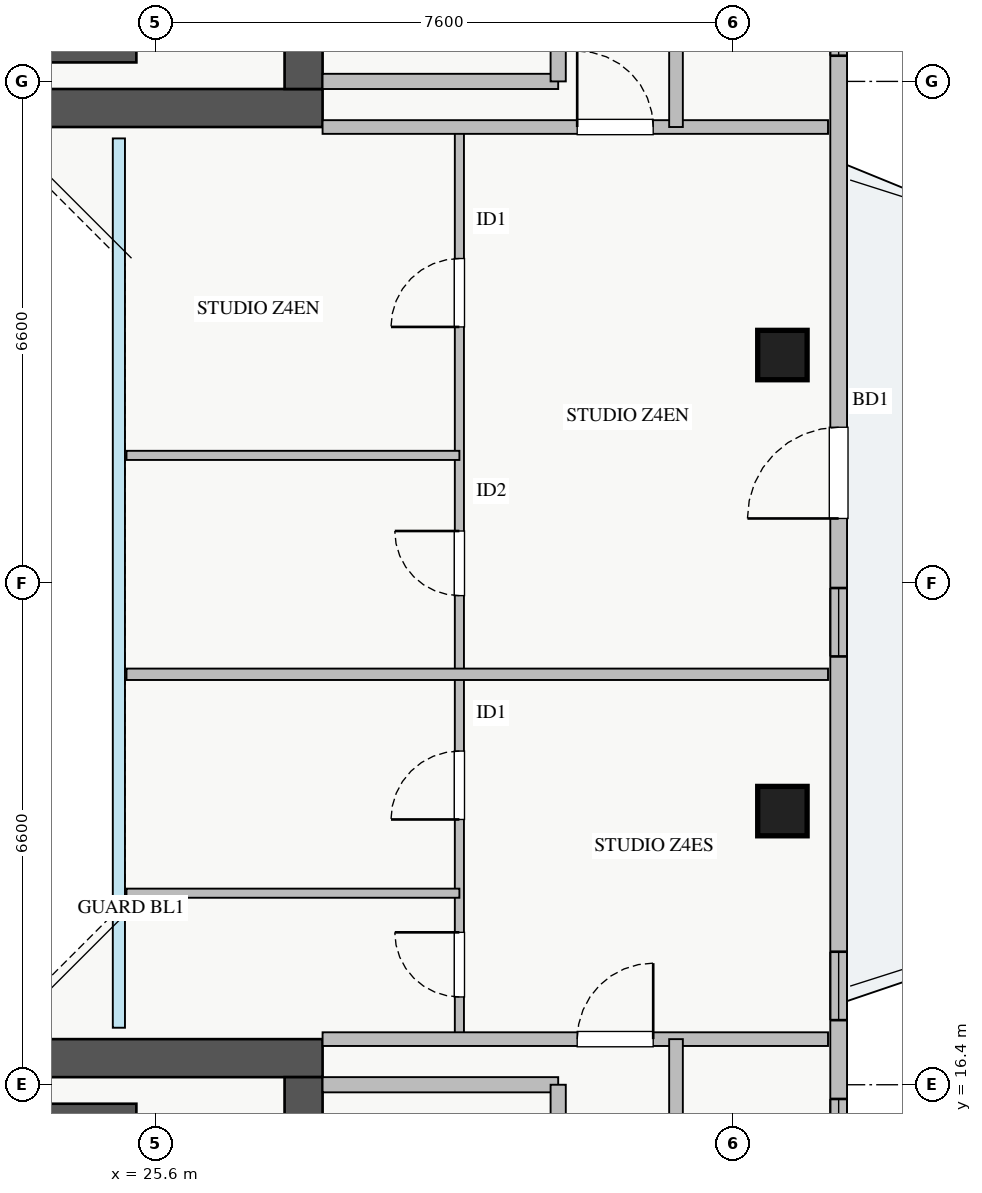
"""IFC4 building model, lengths in metres.
Left out: names, types, materials, properties, quantities, classifications, styles, units other than length and angle.
Written with IfcOpenShell. Run it as: python <this file> out.ifc"""

import sys

from ifc_helpers import new_model, si_unit, direction, frame, frame_2d, origin, origin_2d, place, context, subcontext, project, spatial, rectangle, extrude, source, transform, mapped, element, fill, save


model = new_model("IFC4")
c1 = context("Model", 3, precision=1e-05, world=origin(), true_north=direction((0.0, 1.0)))
c2 = subcontext(c1, "Body", "Model", "MODEL_VIEW")
j1 = project(units=[si_unit("LENGTHUNIT", "METRE"), si_unit("PLANEANGLEUNIT", "RADIAN")], contexts=[c1])
p1 = place(None, origin())
s1 = spatial("IfcSite", under=j1, at=p1, CompositionType="ELEMENT")
p2 = place(p1, origin())
s2 = spatial("IfcBuilding", under=s1, at=p2, CompositionType="ELEMENT")
p3 = place(p2, frame((0.0, 0.0, 247.0)))
s3 = spatial("IfcBuildingStorey", under=s2, at=p3, CompositionType="ELEMENT", Elevation=247.0)
for number, where, z_axis, x_axis in (
    (1, (18.2, 29.95, 0.0), (0.0, 0.0, 1.0), (1.0, 0.0, 0.0)),
    (2, (18.2, 16.05, 0.0), (0.0, 0.0, 1.0), (1.0, 0.0, 0.0)),
):
    element("IfcWall", number, at=place(p3, frame(where, z_axis=z_axis, x_axis=x_axis)), inside=s3, PredefinedType="SHEAR", context=c2, shape_type="SweptSolid", body=[
        extrude(rectangle(XDim=7.15, YDim=0.2, at=frame_2d((3.575, 0.0))), origin(), (0.0, 0.0, 1.0), 3.25),
    ])
p4 = place(p3, frame((10.2, 29.25, 0.0), z_axis=(0.0, 0.0, 1.0), x_axis=(1.0, 0.0, 0.0)))
e3 = element("IfcWall", 3, at=p4, inside=s3, PredefinedType="SHEAR", context=c2, shape_type="SweptSolid", body=[
    extrude(rectangle(XDim=17.6, YDim=0.5, at=frame_2d((8.8, 0.0))), origin(), (0.0, 0.0, 1.0), 3.25),
])
p5 = place(p3, frame((27.55, 29.5, 0.0), z_axis=(0.0, 0.0, 1.0), x_axis=(0.0, 1.0, 0.0)))
e4 = element("IfcWall", 4, at=p5, inside=s3, PredefinedType="SHEAR", context=c2, shape_type="SweptSolid", body=[
    extrude(rectangle(XDim=6.2, YDim=0.5, at=frame_2d((3.1, 0.0))), origin(), (0.0, 0.0, 1.0), 3.25),
])
p6 = place(p5, frame((1.1, 0.0, 0.0)))
e5 = element("IfcOpeningElement", 5, at=p6, cuts=e4, PredefinedType="OPENING", context=c2, shape_type="SweptSolid", body=[
    extrude(rectangle(XDim=1.3, YDim=2.05, at=frame_2d((0.65, 1.025))), frame((0.0, 0.26, 0.0), z_axis=(0.0, -1.0, 0.0), x_axis=(1.0, 0.0, 0.0)), (0.0, 0.0, 1.0), 0.52),
])
p7 = place(p3, frame((10.2, 16.75, 0.0), z_axis=(0.0, 0.0, 1.0), x_axis=(1.0, 0.0, 0.0)))
e6 = element("IfcWall", 6, at=p7, inside=s3, PredefinedType="SHEAR", context=c2, shape_type="SweptSolid", body=[
    extrude(rectangle(XDim=17.6, YDim=0.5, at=frame_2d((8.8, 0.0))), origin(), (0.0, 0.0, 1.0), 3.25),
])
p8 = place(p3, frame((27.55, 10.3, 0.0), z_axis=(0.0, 0.0, 1.0), x_axis=(0.0, 1.0, 0.0)))
e7 = element("IfcWall", 7, at=p8, inside=s3, PredefinedType="SHEAR", context=c2, shape_type="SweptSolid", body=[
    extrude(rectangle(XDim=6.2, YDim=0.5, at=frame_2d((3.1, 0.0))), origin(), (0.0, 0.0, 1.0), 3.25),
])
p9 = place(p8, frame((2.1, 0.0, 0.0)))
e8 = element("IfcOpeningElement", 8, at=p9, cuts=e7, PredefinedType="OPENING", context=c2, shape_type="SweptSolid", body=[
    extrude(rectangle(XDim=1.3, YDim=2.05, at=frame_2d((0.65, 1.025))), frame((0.0, 0.26, 0.0), z_axis=(0.0, -1.0, 0.0), x_axis=(1.0, 0.0, 0.0)), (0.0, 0.0, 1.0), 0.52),
])
m1 = source(origin(), c2, "Body", "SweptSolid", [
    extrude(rectangle(XDim=0.65, YDim=0.65, at=origin_2d()), origin(), (0.0, 0.0, 1.0), 3.25),
])
for number, where, z_axis, x_axis in (
    (9, (33.85, 20.0, 0.0), (0.0, 0.0, 1.0), (1.0, 0.0, 0.0)),
    (10, (33.85, 26.0, 0.0), (0.0, 0.0, 1.0), (1.0, 0.0, 0.0)),
):
    element("IfcColumn", number, at=place(p3, frame(where, z_axis=z_axis, x_axis=x_axis)), inside=s3, PredefinedType="COLUMN", context=c2, shape_type="MappedRepresentation", body=[
        mapped(m1, transform((0.0, 0.0, 0.0), x_axis=(1.0, 0.0, 0.0), y_axis=(0.0, 1.0, 0.0), z_axis=(0.0, 0.0, 1.0), scale=1.0)),
    ])
p10 = place(p3, frame((34.59, 12.35, 0.0), z_axis=(0.0, 0.0, 1.0), x_axis=(0.0, 1.0, 0.0)))
e11 = element("IfcWall", 11, at=p10, inside=s3, PredefinedType="STANDARD", context=c2, shape_type="SweptSolid", body=[
    extrude(rectangle(XDim=21.3, YDim=0.22, at=frame_2d((10.65, 0.0))), origin(), (0.0, 0.0, 1.0), 2.61),
])
p11 = place(p10, frame((11.5, 0.0, 0.0)))
e12 = element("IfcOpeningElement", 12, at=p11, cuts=e11, PredefinedType="OPENING", context=c2, shape_type="SweptSolid", body=[
    extrude(rectangle(XDim=1.2, YDim=2.1, at=frame_2d((0.6, 1.05))), frame((0.0, 0.12, 0.0), z_axis=(0.0, -1.0, 0.0), x_axis=(1.0, 0.0, 0.0)), (0.0, 0.0, 1.0), 0.24),
])
p12 = place(p10, frame((1.463, 0.0, 0.9)))
e13 = element("IfcOpeningElement", 13, at=p12, cuts=e11, PredefinedType="OPENING", context=c2, shape_type="SweptSolid", body=[
    extrude(rectangle(XDim=2.4, YDim=1.48, at=frame_2d((1.2, 0.74))), frame((0.0, 0.12, 0.0), z_axis=(0.0, -1.0, 0.0), x_axis=(1.0, 0.0, 0.0)), (0.0, 0.0, 1.0), 0.24),
])
p13 = place(p10, frame((17.588, 0.0, 0.9)))
e14 = element("IfcOpeningElement", 14, at=p13, cuts=e11, PredefinedType="OPENING", context=c2, shape_type="SweptSolid", body=[
    extrude(rectangle(XDim=2.1, YDim=1.48, at=frame_2d((1.05, 0.74))), frame((0.0, 0.12, 0.0), z_axis=(0.0, -1.0, 0.0), x_axis=(1.0, 0.0, 0.0)), (0.0, 0.0, 1.0), 0.24),
])
p14 = place(p10, frame((4.9, 0.0, 0.9)))
e15 = element("IfcOpeningElement", 15, at=p14, cuts=e11, PredefinedType="OPENING", context=c2, shape_type="SweptSolid", body=[
    extrude(rectangle(XDim=0.9, YDim=1.2, at=frame_2d((0.45, 0.6))), frame((0.0, 0.12, 0.0), z_axis=(0.0, -1.0, 0.0), x_axis=(1.0, 0.0, 0.0)), (0.0, 0.0, 1.0), 0.24),
])
p15 = place(p10, frame((9.685, 0.0, 0.9)))
e16 = element("IfcOpeningElement", 16, at=p15, cuts=e11, PredefinedType="OPENING", context=c2, shape_type="SweptSolid", body=[
    extrude(rectangle(XDim=0.9, YDim=1.2, at=frame_2d((0.45, 0.6))), frame((0.0, 0.12, 0.0), z_axis=(0.0, -1.0, 0.0), x_axis=(1.0, 0.0, 0.0)), (0.0, 0.0, 1.0), 0.24),
])
p16 = place(p3, frame((27.8, 29.6, 0.0), z_axis=(0.0, 0.0, 1.0), x_axis=(1.0, 0.0, 0.0)))
e17 = element("IfcWall", 17, at=p16, inside=s3, PredefinedType="PARTITIONING", context=c2, shape_type="SweptSolid", body=[
    extrude(rectangle(XDim=3.1, YDim=0.2, at=frame_2d((1.55, 0.0))), origin(), (0.0, 0.0, 1.0), 3.07),
])
p17 = place(p3, frame((30.9, 29.6, 0.0), z_axis=(0.0, 0.0, 1.0), x_axis=(0.0, 1.0, 0.0)))
e18 = element("IfcWall", 18, at=p17, inside=s3, PredefinedType="PARTITIONING", context=c2, shape_type="SweptSolid", body=[
    extrude(rectangle(XDim=3.9, YDim=0.2, at=frame_2d((1.95, 0.0))), origin(), (0.0, 0.0, 1.0), 2.715),
])
p18 = place(p17, frame((1.4, 0.0, 0.0)))
e19 = element("IfcOpeningElement", 19, at=p18, cuts=e18, PredefinedType="OPENING", context=c2, shape_type="SweptSolid", body=[
    extrude(rectangle(XDim=1.1, YDim=2.05, at=frame_2d((0.55, 1.025))), frame((0.0, 0.11, 0.0), z_axis=(0.0, -1.0, 0.0), x_axis=(1.0, 0.0, 0.0)), (0.0, 0.0, 1.0), 0.22),
])
p19 = place(p3, frame((27.8, 16.4, 0.0), z_axis=(0.0, 0.0, 1.0), x_axis=(1.0, 0.0, 0.0)))
e20 = element("IfcWall", 20, at=p19, inside=s3, PredefinedType="PARTITIONING", context=c2, shape_type="SweptSolid", body=[
    extrude(rectangle(XDim=3.1, YDim=0.2, at=frame_2d((1.55, 0.0))), origin(), (0.0, 0.0, 1.0), 3.07),
])
p20 = place(p3, frame((30.9, 12.5, 0.0), z_axis=(0.0, 0.0, 1.0), x_axis=(0.0, 1.0, 0.0)))
e21 = element("IfcWall", 21, at=p20, inside=s3, PredefinedType="PARTITIONING", context=c2, shape_type="SweptSolid", body=[
    extrude(rectangle(XDim=3.9, YDim=0.2, at=frame_2d((1.95, 0.0))), origin(), (0.0, 0.0, 1.0), 2.715),
])
p21 = place(p20, frame((1.4, 0.0, 0.0)))
e22 = element("IfcOpeningElement", 22, at=p21, cuts=e21, PredefinedType="OPENING", context=c2, shape_type="SweptSolid", body=[
    extrude(rectangle(XDim=1.1, YDim=2.05, at=frame_2d((0.55, 1.025))), frame((0.0, 0.11, 0.0), z_axis=(0.0, -1.0, 0.0), x_axis=(1.0, 0.0, 0.0)), (0.0, 0.0, 1.0), 0.22),
])
p22 = place(p3, frame((29.6, 17.0, 0.0), z_axis=(0.0, 0.0, 1.0), x_axis=(0.0, 1.0, 0.0)))
e23 = element("IfcWall", 23, at=p22, inside=s3, PredefinedType="PLUMBINGWALL", context=c2, shape_type="SweptSolid", body=[
    extrude(rectangle(XDim=4.8, YDim=0.12, at=frame_2d((2.4, 0.0))), origin(), (0.0, 0.0, 1.0), 3.07),
])
p23 = place(p22, frame((0.555, 0.0, 0.0)))
e24 = element("IfcOpeningElement", 24, at=p23, cuts=e23, PredefinedType="OPENING", context=c2, shape_type="SweptSolid", body=[
    extrude(rectangle(XDim=0.85, YDim=2.05, at=frame_2d((0.425, 1.025))), frame((0.0, 0.07, 0.0), z_axis=(0.0, -1.0, 0.0), x_axis=(1.0, 0.0, 0.0)), (0.0, 0.0, 1.0), 0.14),
])
p24 = place(p22, frame((2.89, 0.0, 0.0)))
e25 = element("IfcOpeningElement", 25, at=p24, cuts=e23, PredefinedType="OPENING", context=c2, shape_type="SweptSolid", body=[
    extrude(rectangle(XDim=0.9, YDim=2.05, at=frame_2d((0.45, 1.025))), frame((0.0, 0.07, 0.0), z_axis=(0.0, -1.0, 0.0), x_axis=(1.0, 0.0, 0.0)), (0.0, 0.0, 1.0), 0.14),
])
p25 = place(p3, frame((25.22, 18.92, 0.0), z_axis=(0.0, 0.0, 1.0), x_axis=(1.0, 0.0, 0.0)))
e26 = element("IfcWall", 26, at=p25, inside=s3, PredefinedType="PLUMBINGWALL", context=c2, shape_type="SweptSolid", body=[
    extrude(rectangle(XDim=4.38, YDim=0.12, at=frame_2d((2.19, 0.0))), origin(), (0.0, 0.0, 1.0), 3.07),
])
p26 = place(p3, frame((29.6, 21.8, 0.0), z_axis=(0.0, 0.0, 1.0), x_axis=(0.0, 1.0, 0.0)))
e27 = element("IfcWall", 27, at=p26, inside=s3, PredefinedType="PLUMBINGWALL", context=c2, shape_type="SweptSolid", body=[
    extrude(rectangle(XDim=7.2, YDim=0.12, at=frame_2d((3.6, 0.0))), origin(), (0.0, 0.0, 1.0), 3.07),
])
p27 = place(p26, frame((1.035, 0.0, 0.0)))
e28 = element("IfcOpeningElement", 28, at=p27, cuts=e27, PredefinedType="OPENING", context=c2, shape_type="SweptSolid", body=[
    extrude(rectangle(XDim=0.85, YDim=2.05, at=frame_2d((0.425, 1.025))), frame((0.0, 0.07, 0.0), z_axis=(0.0, -1.0, 0.0), x_axis=(1.0, 0.0, 0.0)), (0.0, 0.0, 1.0), 0.14),
])
p28 = place(p26, frame((4.57, 0.0, 0.0)))
e29 = element("IfcOpeningElement", 29, at=p28, cuts=e27, PredefinedType="OPENING", context=c2, shape_type="SweptSolid", body=[
    extrude(rectangle(XDim=0.9, YDim=2.05, at=frame_2d((0.45, 1.025))), frame((0.0, 0.07, 0.0), z_axis=(0.0, -1.0, 0.0), x_axis=(1.0, 0.0, 0.0)), (0.0, 0.0, 1.0), 0.14),
])
p29 = place(p3, frame((25.22, 24.68, 0.0), z_axis=(0.0, 0.0, 1.0), x_axis=(1.0, 0.0, 0.0)))
e30 = element("IfcWall", 30, at=p29, inside=s3, PredefinedType="PLUMBINGWALL", context=c2, shape_type="SweptSolid", body=[
    extrude(rectangle(XDim=4.38, YDim=0.12, at=frame_2d((2.19, 0.0))), origin(), (0.0, 0.0, 1.0), 2.815),
])
p30 = place(p3, frame((25.22, 21.8, 0.0), z_axis=(0.0, 0.0, 1.0), x_axis=(1.0, 0.0, 0.0)))
e31 = element("IfcWall", 31, at=p30, inside=s3, PredefinedType="PARTITIONING", context=c2, shape_type="SweptSolid", body=[
    extrude(rectangle(XDim=9.23, YDim=0.15, at=frame_2d((4.615, 0.0))), origin(), (0.0, 0.0, 1.0), 3.07),
])
p31 = place(p3, frame((27.8, 17.0, 0.0), z_axis=(0.0, 0.0, 1.0), x_axis=(1.0, 0.0, 0.0)))
e32 = element("IfcWall", 32, at=p31, inside=s3, PredefinedType="PARTITIONING", context=c2, shape_type="SweptSolid", body=[
    extrude(rectangle(XDim=6.65, YDim=0.18, at=frame_2d((3.325, 0.0))), origin(), (0.0, 0.0, 1.0), 3.07),
])
p32 = place(p31, frame((3.35, 0.0, 0.0)))
e33 = element("IfcOpeningElement", 33, at=p32, cuts=e32, PredefinedType="OPENING", context=c2, shape_type="SweptSolid", body=[
    extrude(rectangle(XDim=1.0, YDim=2.05, at=frame_2d((0.5, 1.025))), frame((0.0, 0.1, 0.0), z_axis=(0.0, -1.0, 0.0), x_axis=(1.0, 0.0, 0.0)), (0.0, 0.0, 1.0), 0.2),
])
p33 = place(p3, frame((27.8, 29.0, 0.0), z_axis=(0.0, 0.0, 1.0), x_axis=(1.0, 0.0, 0.0)))
e34 = element("IfcWall", 34, at=p33, inside=s3, PredefinedType="PARTITIONING", context=c2, shape_type="SweptSolid", body=[
    extrude(rectangle(XDim=6.65, YDim=0.18, at=frame_2d((3.325, 0.0))), origin(), (0.0, 0.0, 1.0), 3.07),
])
p34 = place(p33, frame((3.35, 0.0, 0.0)))
e35 = element("IfcOpeningElement", 35, at=p34, cuts=e34, PredefinedType="OPENING", context=c2, shape_type="SweptSolid", body=[
    extrude(rectangle(XDim=1.0, YDim=2.05, at=frame_2d((0.5, 1.025))), frame((0.0, 0.1, 0.0), z_axis=(0.0, -1.0, 0.0), x_axis=(1.0, 0.0, 0.0)), (0.0, 0.0, 1.0), 0.2),
])
p35 = place(p3, frame((32.45, 29.0, 0.0), z_axis=(0.0, 0.0, 1.0), x_axis=(0.0, 1.0, 0.0)))
e36 = element("IfcWall", 36, at=p35, inside=s3, PredefinedType="PARTITIONING", context=c2, shape_type="SweptSolid", body=[
    extrude(rectangle(XDim=5.18, YDim=0.18, at=frame_2d((2.59, 0.0))), origin(), (0.0, 0.0, 1.0), 3.07),
])
p36 = place(p35, frame((1.25, 0.0, 0.0)))
e37 = element("IfcOpeningElement", 37, at=p36, cuts=e36, PredefinedType="OPENING", context=c2, shape_type="SweptSolid", body=[
    extrude(rectangle(XDim=0.9, YDim=2.05, at=frame_2d((0.45, 1.025))), frame((0.0, 0.1, 0.0), z_axis=(0.0, -1.0, 0.0), x_axis=(1.0, 0.0, 0.0)), (0.0, 0.0, 1.0), 0.2),
])
p37 = place(p3, frame((32.45, 11.82, 0.0), z_axis=(0.0, 0.0, 1.0), x_axis=(0.0, 1.0, 0.0)))
e38 = element("IfcWall", 38, at=p37, inside=s3, PredefinedType="PARTITIONING", context=c2, shape_type="SweptSolid", body=[
    extrude(rectangle(XDim=5.18, YDim=0.18, at=frame_2d((2.59, 0.0))), origin(), (0.0, 0.0, 1.0), 3.07),
])
p38 = place(p37, frame((1.25, 0.0, 0.0)))
e39 = element("IfcOpeningElement", 39, at=p38, cuts=e38, PredefinedType="OPENING", context=c2, shape_type="SweptSolid", body=[
    extrude(rectangle(XDim=0.9, YDim=2.05, at=frame_2d((0.45, 1.025))), frame((0.0, 0.1, 0.0), z_axis=(0.0, -1.0, 0.0), x_axis=(1.0, 0.0, 0.0)), (0.0, 0.0, 1.0), 0.2),
])
m2 = source(origin(), c2, "Body", "SweptSolid", [
    extrude(rectangle(XDim=1.2, YDim=2.1, at=frame_2d((0.6, 1.05))), frame((0.0, 0.025, 0.0), z_axis=(0.0, -1.0, 0.0), x_axis=(1.0, 0.0, 0.0)), (0.0, 0.0, 1.0), 0.05),
])
p39 = place(p11, origin())
e40 = element("IfcDoor", 40, at=p39, inside=s3, OperationType="SINGLE_SWING_LEFT", PredefinedType="DOOR", context=c2, shape_type="MappedRepresentation", body=[
    mapped(m2, transform((0.0, 0.0, 0.0), x_axis=(1.0, 0.0, 0.0), y_axis=(0.0, 1.0, 0.0), z_axis=(0.0, 0.0, 1.0), scale=1.0)),
])
fill(e12, e40)
m3 = source(origin(), c2, "Body", "SweptSolid", [
    extrude(rectangle(XDim=2.4, YDim=1.48, at=frame_2d((1.2, 0.74))), frame((0.0, 0.03, 0.0), z_axis=(0.0, -1.0, 0.0), x_axis=(1.0, 0.0, 0.0)), (0.0, 0.0, 1.0), 0.06),
])
p40 = place(p12, origin())
e41 = element("IfcWindow", 41, at=p40, inside=s3, PartitioningType="TRIPLE_PANEL_VERTICAL", PredefinedType="WINDOW", context=c2, shape_type="MappedRepresentation", body=[
    mapped(m3, transform((0.0, 0.0, 0.0), x_axis=(1.0, 0.0, 0.0), y_axis=(0.0, 1.0, 0.0), z_axis=(0.0, 0.0, 1.0), scale=1.0)),
])
fill(e13, e41)
m4 = source(origin(), c2, "Body", "SweptSolid", [
    extrude(rectangle(XDim=2.1, YDim=1.48, at=frame_2d((1.05, 0.74))), frame((0.0, 0.03, 0.0), z_axis=(0.0, -1.0, 0.0), x_axis=(1.0, 0.0, 0.0)), (0.0, 0.0, 1.0), 0.06),
])
p41 = place(p13, origin())
e42 = element("IfcWindow", 42, at=p41, inside=s3, PartitioningType="TRIPLE_PANEL_VERTICAL", PredefinedType="WINDOW", context=c2, shape_type="MappedRepresentation", body=[
    mapped(m4, transform((0.0, 0.0, 0.0), x_axis=(1.0, 0.0, 0.0), y_axis=(0.0, 1.0, 0.0), z_axis=(0.0, 0.0, 1.0), scale=1.0)),
])
fill(e14, e42)
m5 = source(origin(), c2, "Body", "SweptSolid", [
    extrude(rectangle(XDim=0.85, YDim=2.05, at=frame_2d((0.425, 1.025))), frame((0.0, 0.025, 0.0), z_axis=(0.0, -1.0, 0.0), x_axis=(1.0, 0.0, 0.0)), (0.0, 0.0, 1.0), 0.05),
])
p42 = place(p23, origin())
e43 = element("IfcDoor", 43, at=p42, inside=s3, OperationType="SINGLE_SWING_RIGHT", PredefinedType="DOOR", context=c2, shape_type="MappedRepresentation", body=[
    mapped(m5, transform((0.0, 0.0, 0.0), x_axis=(1.0, 0.0, 0.0), y_axis=(0.0, 1.0, 0.0), z_axis=(0.0, 0.0, 1.0), scale=1.0)),
])
fill(e24, e43)
m6 = source(origin(), c2, "Body", "SweptSolid", [
    extrude(rectangle(XDim=0.9, YDim=2.05, at=frame_2d((0.45, 1.025))), frame((0.0, 0.025, 0.0), z_axis=(0.0, -1.0, 0.0), x_axis=(1.0, 0.0, 0.0)), (0.0, 0.0, 1.0), 0.05),
])
p43 = place(p24, origin())
e44 = element("IfcDoor", 44, at=p43, inside=s3, OperationType="SINGLE_SWING_LEFT", PredefinedType="DOOR", context=c2, shape_type="MappedRepresentation", body=[
    mapped(m6, transform((0.0, 0.0, 0.0), x_axis=(1.0, 0.0, 0.0), y_axis=(0.0, 1.0, 0.0), z_axis=(0.0, 0.0, 1.0), scale=1.0)),
])
fill(e25, e44)
p44 = place(p27, origin())
e45 = element("IfcDoor", 45, at=p44, inside=s3, OperationType="SINGLE_SWING_RIGHT", PredefinedType="DOOR", context=c2, shape_type="MappedRepresentation", body=[
    mapped(m5, transform((0.0, 0.0, 0.0), x_axis=(1.0, 0.0, 0.0), y_axis=(0.0, 1.0, 0.0), z_axis=(0.0, 0.0, 1.0), scale=1.0)),
])
fill(e28, e45)
p45 = place(p28, origin())
e46 = element("IfcDoor", 46, at=p45, inside=s3, OperationType="SINGLE_SWING_LEFT", PredefinedType="DOOR", context=c2, shape_type="MappedRepresentation", body=[
    mapped(m6, transform((0.0, 0.0, 0.0), x_axis=(1.0, 0.0, 0.0), y_axis=(0.0, 1.0, 0.0), z_axis=(0.0, 0.0, 1.0), scale=1.0)),
])
fill(e29, e46)
m7 = source(origin(), c2, "Body", "SweptSolid", [
    extrude(rectangle(XDim=1.0, YDim=2.05, at=frame_2d((0.5, 1.025))), frame((0.0, 0.025, 0.0), z_axis=(0.0, -1.0, 0.0), x_axis=(1.0, 0.0, 0.0)), (0.0, 0.0, 1.0), 0.05),
])
p46 = place(p32, origin())
e47 = element("IfcDoor", 47, at=p46, inside=s3, OperationType="SINGLE_SWING_RIGHT", PredefinedType="DOOR", context=c2, shape_type="MappedRepresentation", body=[
    mapped(m7, transform((0.0, 0.0, 0.0), x_axis=(1.0, 0.0, 0.0), y_axis=(0.0, 1.0, 0.0), z_axis=(0.0, 0.0, 1.0), scale=1.0)),
])
fill(e33, e47)
p47 = place(p34, origin())
e48 = element("IfcDoor", 48, at=p47, inside=s3, OperationType="SINGLE_SWING_LEFT", PredefinedType="DOOR", context=c2, shape_type="MappedRepresentation", body=[
    mapped(m7, transform((0.0, 0.0, 0.0), x_axis=(1.0, 0.0, 0.0), y_axis=(0.0, 1.0, 0.0), z_axis=(0.0, 0.0, 1.0), scale=1.0)),
])
fill(e35, e48)
m8 = source(origin(), c2, "Body", "SweptSolid", [
    extrude(rectangle(XDim=0.9, YDim=1.2, at=frame_2d((0.45, 0.6))), frame((0.0, 0.03, 0.0), z_axis=(0.0, -1.0, 0.0), x_axis=(1.0, 0.0, 0.0)), (0.0, 0.0, 1.0), 0.06),
])
p48 = place(p14, origin())
e49 = element("IfcWindow", 49, at=p48, inside=s3, PartitioningType="SINGLE_PANEL", PredefinedType="WINDOW", context=c2, shape_type="MappedRepresentation", body=[
    mapped(m8, transform((0.0, 0.0, 0.0), x_axis=(1.0, 0.0, 0.0), y_axis=(0.0, 1.0, 0.0), z_axis=(0.0, 0.0, 1.0), scale=1.0)),
])
fill(e15, e49)
p49 = place(p15, origin())
e50 = element("IfcWindow", 50, at=p49, inside=s3, PartitioningType="SINGLE_PANEL", PredefinedType="WINDOW", context=c2, shape_type="MappedRepresentation", body=[
    mapped(m8, transform((0.0, 0.0, 0.0), x_axis=(1.0, 0.0, 0.0), y_axis=(0.0, 1.0, 0.0), z_axis=(0.0, 0.0, 1.0), scale=1.0)),
])
fill(e16, e50)
save(model, sys.argv[1])
